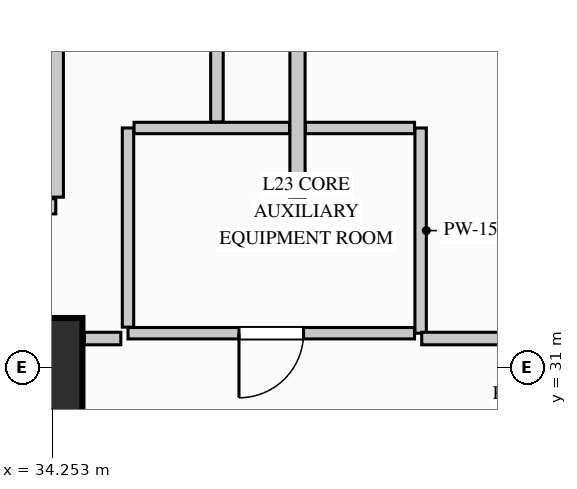
"""IFC4 building model, lengths in metres.
Left out: names, types, materials, properties, quantities, classifications, styles, units other than length and angle.
Written with IfcOpenShell. Run it as: python <this file> out.ifc"""

import sys

from ifc_helpers import new_model, si_unit, direction, frame, frame_2d, origin, origin_2d, place, context, subcontext, project, spatial, rectangle, extrude, element, fill, save


model = new_model("IFC4")
c1 = context("Model", 3, precision=1e-05, world=origin(), true_north=direction((0.0, 1.0)))
c2 = subcontext(c1, "Body", "Model", "MODEL_VIEW")
j1 = project(units=[si_unit("LENGTHUNIT", "METRE"), si_unit("PLANEANGLEUNIT", "RADIAN")], contexts=[c1])
p1 = place(None, origin())
s1 = spatial("IfcSite", under=j1, at=p1, CompositionType="ELEMENT")
p2 = place(p1, origin())
s2 = spatial("IfcBuilding", under=s1, at=p2, CompositionType="ELEMENT")
p3 = place(p2, frame((0.0, 0.0, 101.8)))
s3 = spatial("IfcBuildingStorey", under=s2, at=p3, CompositionType="ELEMENT", Elevation=101.8)
p4 = place(p3, frame((34.0, 31.0, 0.0), z_axis=(0.0, 0.0, 1.0), x_axis=(1.0, 0.0, 0.0)))
e1 = element("IfcColumn", 1, at=p4, inside=s3, PredefinedType="COLUMN", context=c2, shape_type="SweptSolid", body=[
    extrude(rectangle(XDim=1.3, YDim=1.3, at=origin_2d()), origin(), (0.0, 0.0, 1.0), 4.4),
])
p5 = place(p3, frame((37.48, 33.24, 0.0), z_axis=(0.0, 0.0, 1.0), x_axis=(0.0, 1.0, 0.0)))
e2 = element("IfcWall", 2, at=p5, inside=s3, PredefinedType="PARTITIONING", context=c2, shape_type="SweptSolid", body=[
    extrude(rectangle(XDim=7.42, YDim=0.2, at=frame_2d((3.71, 0.0))), origin(), (0.0, 0.0, 1.0), 4.05),
])
p6 = place(p3, frame((30.5, 33.12, 0.0), z_axis=(0.0, 0.0, 1.0), x_axis=(1.0, 0.0, 0.0)))
e3 = element("IfcWall", 3, at=p6, inside=s3, PredefinedType="PARTITIONING", context=c2, shape_type="SweptSolid", body=[
    extrude(rectangle(XDim=3.8, YDim=0.2, at=frame_2d((1.9, 0.0))), origin(), (0.0, 0.0, 1.0), 4.05),
])
p7 = place(p3, frame((34.3, 33.24, 0.0), z_axis=(0.0, 0.0, 1.0), x_axis=(0.0, 1.0, 0.0)))
e4 = element("IfcWall", 4, at=p7, inside=s3, PredefinedType="PARTITIONING", context=c2, shape_type="SweptSolid", body=[
    extrude(rectangle(XDim=2.17, YDim=0.2, at=frame_2d((1.085, 0.0))), origin(), (0.0, 0.0, 1.0), 4.05),
])
p8 = place(p3, frame((39.1, 34.15, 0.0), z_axis=(0.0, 0.0, 1.0), x_axis=(0.0, -1.0, 0.0)))
e5 = element("IfcWall", 5, at=p8, inside=s3, PredefinedType="PARTITIONING", context=c2, shape_type="SweptSolid", body=[
    extrude(rectangle(XDim=2.7, YDim=0.15, at=frame_2d((1.35, 0.0))), origin(), (0.0, 0.0, 1.0), 4.05),
])
p9 = place(p3, frame((39.02, 31.45, 0.0), z_axis=(0.0, 0.0, 1.0), x_axis=(-1.0, 0.0, 0.0)))
e6 = element("IfcWall", 6, at=p9, inside=s3, PredefinedType="PARTITIONING", context=c2, shape_type="SweptSolid", body=[
    extrude(rectangle(XDim=3.77, YDim=0.15, at=frame_2d((1.885, 0.0))), origin(), (0.0, 0.0, 1.0), 4.05),
])
p10 = place(p9, frame((1.46, 0.0, 0.0)))
e7 = element("IfcOpeningElement", 7, at=p10, cuts=e6, PredefinedType="OPENING", context=c2, shape_type="SweptSolid", body=[
    extrude(rectangle(XDim=0.85, YDim=2.1, at=frame_2d((0.425, 1.05))), frame((0.0, 0.085, 0.0), z_axis=(0.0, -1.0, 0.0), x_axis=(1.0, 0.0, 0.0)), (0.0, 0.0, 1.0), 0.17),
])
p11 = place(p3, frame((35.25, 31.53, 0.0), z_axis=(0.0, 0.0, 1.0), x_axis=(0.0, 1.0, 0.0)))
e8 = element("IfcWall", 8, at=p11, inside=s3, PredefinedType="PARTITIONING", context=c2, shape_type="SweptSolid", body=[
    extrude(rectangle(XDim=2.62, YDim=0.15, at=frame_2d((1.31, 0.0))), origin(), (0.0, 0.0, 1.0), 4.05),
])
p12 = place(p3, frame((37.585, 34.15, 0.0), z_axis=(0.0, 0.0, 1.0), x_axis=(1.0, 0.0, 0.0)))
e9 = element("IfcWall", 9, at=p12, inside=s3, PredefinedType="PARTITIONING", context=c2, shape_type="SweptSolid", body=[
    extrude(rectangle(XDim=1.435, YDim=0.15, at=frame_2d((0.718, 0.0))), origin(), (0.0, 0.0, 1.0), 4.05),
])
p13 = place(p3, frame((35.33, 34.15, 0.0), z_axis=(0.0, 0.0, 1.0), x_axis=(1.0, 0.0, 0.0)))
e10 = element("IfcWall", 10, at=p13, inside=s3, PredefinedType="PARTITIONING", context=c2, shape_type="SweptSolid", body=[
    extrude(rectangle(XDim=2.045, YDim=0.15, at=frame_2d((1.022, 0.0))), origin(), (0.0, 0.0, 1.0), 4.05),
])
p14 = place(p3, frame((36.42, 38.215, 0.0), z_axis=(0.0, 0.0, 1.0), x_axis=(0.0, -1.0, 0.0)))
e11 = element("IfcWall", 11, at=p14, inside=s3, PredefinedType="PARTITIONING", context=c2, shape_type="SweptSolid", body=[
    extrude(rectangle(XDim=3.985, YDim=0.165, at=frame_2d((1.993, 0.0))), origin(), (0.0, 0.0, 1.0), 4.05),
])
p15 = place(p3, frame((35.156, 31.38, 0.0), z_axis=(0.0, 0.0, 1.0), x_axis=(-1.0, 0.0, 0.0)))
e12 = element("IfcWall", 12, at=p15, inside=s3, PredefinedType="PARTITIONING", context=c2, shape_type="SweptSolid", body=[
    extrude(rectangle(XDim=0.48, YDim=0.165, at=frame_2d((0.24, 0.0))), origin(), (0.0, 0.0, 1.0), 4.05),
])
p16 = place(p3, frame((41.825, 31.38, 0.0), z_axis=(0.0, 0.0, 1.0), x_axis=(-1.0, 0.0, 0.0)))
e13 = element("IfcWall", 13, at=p16, inside=s3, PredefinedType="PARTITIONING", context=c2, shape_type="SweptSolid", body=[
    extrude(rectangle(XDim=2.71, YDim=0.165, at=frame_2d((1.355, 0.0))), origin(), (0.0, 0.0, 1.0), 4.05),
])
p17 = place(p10, origin())
e14 = element("IfcDoor", 14, at=p17, inside=s3, OperationType="SINGLE_SWING_RIGHT", PredefinedType="DOOR", context=c2, shape_type="SweptSolid", body=[
    extrude(rectangle(XDim=0.85, YDim=2.1, at=frame_2d((0.425, 1.05))), frame((0.0, 0.025, 0.0), z_axis=(0.0, -1.0, 0.0), x_axis=(1.0, 0.0, 0.0)), (0.0, 0.0, 1.0), 0.05),
])
fill(e7, e14)
save(model, sys.argv[1])
